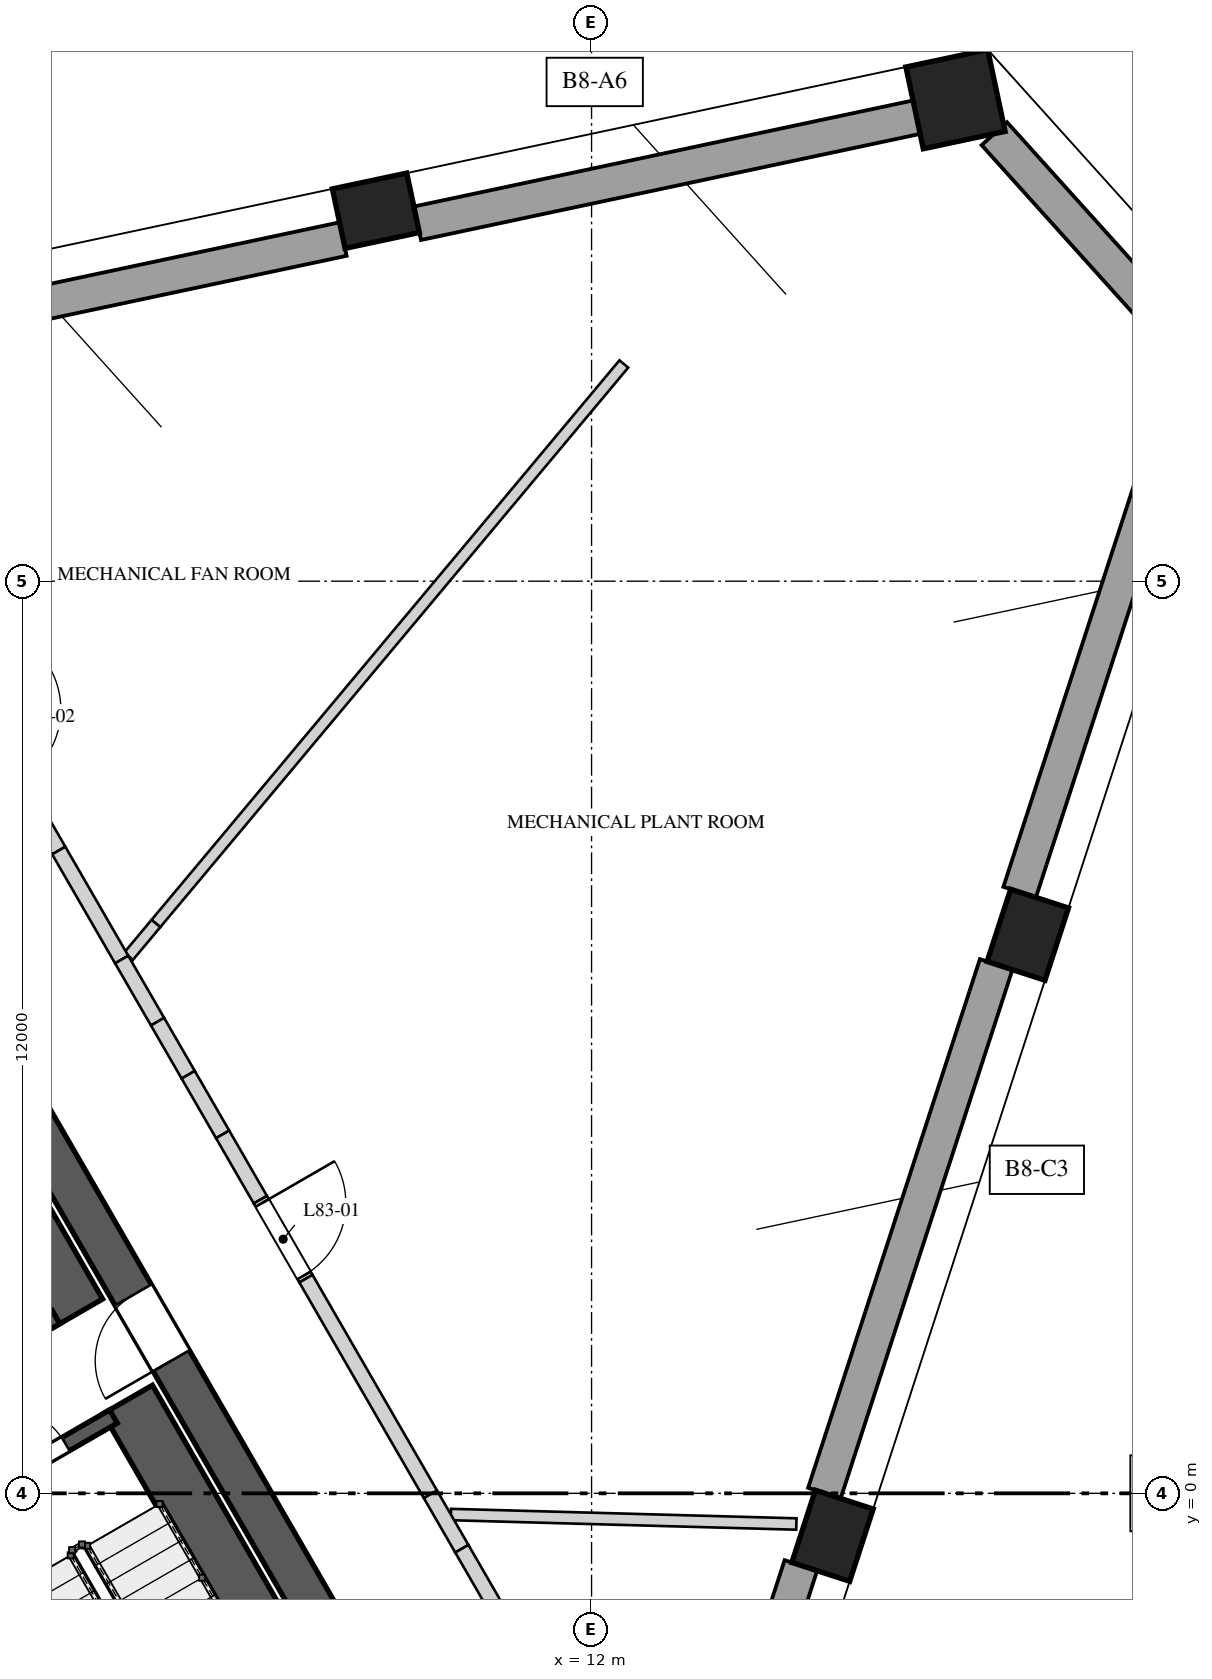
"""IFC4 building model, lengths in metres.
Left out: names, types, materials, properties, quantities, classifications, styles, units other than length and angle.
Written with IfcOpenShell. Run it as: python <this file> out.ifc"""

import sys

from ifc_helpers import new_model, si_unit, direction, frame, frame_2d, origin, origin_2d, place, context, subcontext, project, spatial, polyline, rectangle, outline, extrude, element, fill, save


model = new_model("IFC4")
c1 = context("Model", 3, precision=1e-05, world=origin(), true_north=direction((0.0, 1.0)))
c2 = subcontext(c1, "Body", "Model", "MODEL_VIEW")
j1 = project(units=[si_unit("LENGTHUNIT", "METRE"), si_unit("PLANEANGLEUNIT", "RADIAN")], contexts=[c1])
p1 = place(None, origin())
s1 = spatial("IfcSite", under=j1, at=p1, CompositionType="ELEMENT")
p2 = place(p1, origin())
s2 = spatial("IfcBuilding", under=s1, at=p2, CompositionType="ELEMENT")
p3 = place(p2, frame((0.0, 0.0, 361.4)))
s3 = spatial("IfcBuildingStorey", under=s2, at=p3, CompositionType="ELEMENT", Elevation=361.4)
p4 = place(p3, frame((9.93, -4.25, 0.0), z_axis=(0.0, 0.0, 1.0), x_axis=(-0.499994590896, 0.86602852671, 0.0)))
e1 = element("IfcWall", 1, at=p4, inside=s3, PredefinedType="SHEAR", context=c2, shape_type="SweptSolid", body=[
    extrude(rectangle(XDim=17.292, YDim=0.55, at=frame_2d((8.646, 0.0))), origin(), (0.0, 0.0, 1.0), 4.5),
])
p5 = place(p4, frame((6.921, 0.0, 0.0)))
e2 = element("IfcOpeningElement", 2, at=p5, cuts=e1, PredefinedType="OPENING", context=c2, shape_type="SweptSolid", body=[
    extrude(rectangle(XDim=1.0, YDim=2.4, at=frame_2d((0.5, 1.2))), frame((0.0, 0.285, 0.0), z_axis=(0.0, -1.0, 0.0), x_axis=(1.0, 0.0, 0.0)), (0.0, 0.0, 1.0), 0.57),
])
for number, where, z_axis, x_axis in (
    (3, (15.17, -0.558, 0.0), (0.0, 0.0, 1.0), (0.309, 0.951, 0.0)),
    (4, (17.739, 7.349, 0.0), (0.0, 0.0, 1.0), (0.309, 0.951, 0.0)),
):
    element("IfcColumn", number, at=place(p3, frame(where, z_axis=z_axis, x_axis=x_axis)), inside=s3, PredefinedType="COLUMN", context=c2, shape_type="SweptSolid", body=[
        extrude(rectangle(XDim=1.0, YDim=0.8, at=origin_2d()), origin(), (0.0, 0.0, 1.0), 4.5),
    ])
p6 = place(p3, frame((16.788, 18.341, 0.0), z_axis=(0.0, 0.0, 1.0), x_axis=(-0.978147600734, -0.207911690818, 0.0)))
e5 = element("IfcColumn", 5, at=p6, inside=s3, PredefinedType="COLUMN", context=c2, shape_type="SweptSolid", body=[
    extrude(rectangle(XDim=1.1, YDim=1.1, at=origin_2d()), origin(), (0.0, 0.0, 1.0), 4.5),
])
p7 = place(p3, frame((9.163, 16.874, 0.0), z_axis=(0.0, 0.0, 1.0), x_axis=(-0.978147600734, -0.207911690818, 0.0)))
e6 = element("IfcColumn", 6, at=p7, inside=s3, PredefinedType="COLUMN", context=c2, shape_type="SweptSolid", body=[
    extrude(rectangle(XDim=1.0, YDim=0.8, at=origin_2d()), origin(), (0.0, 0.0, 1.0), 4.5),
])
for number, where, z_axis, x_axis in (
    (7, (12.494, -7.905, 0.0), (0.0, 0.0, 1.0), (0.309, 0.951, 0.0)),
    (8, (15.063, 0.002, 0.0), (0.0, 0.0, 1.0), (0.309, 0.951, 0.0)),
):
    element("IfcWall", number, at=place(p3, frame(where, z_axis=z_axis, x_axis=x_axis)), inside=s3, PredefinedType="SOLIDWALL", context=c2, shape_type="SweptSolid", body=[
        extrude(rectangle(XDim=7.314, YDim=0.45, at=frame_2d((3.657, 0.0))), origin(), (0.0, 0.0, 1.0), 3.8),
    ])
p8 = place(p3, frame((17.632, 7.909, 0.0), z_axis=(0.0, 0.0, 1.0), x_axis=(0.309018647645, 0.951055979114, 0.0)))
e9 = element("IfcWall", 9, at=p8, inside=s3, PredefinedType="SOLIDWALL", context=c2, shape_type="SweptSolid", body=[
    extrude(rectangle(XDim=6.714, YDim=0.45, at=frame_2d((3.357, 0.0))), origin(), (0.0, 0.0, 1.0), 3.8),
])
p9 = place(p3, frame((19.598, 15.335, 0.0), z_axis=(0.0, 0.0, 1.0), x_axis=(-0.669109997009, 0.743163381702, 0.0)))
e10 = element("IfcWall", 10, at=p9, inside=s3, PredefinedType="SOLIDWALL", context=c2, shape_type="SweptSolid", body=[
    extrude(rectangle(XDim=3.435, YDim=0.45, at=frame_2d((1.718, 0.0))), origin(), (0.0, 0.0, 1.0), 3.8),
])
p10 = place(p3, frame((8.731, 16.501, 0.0), z_axis=(0.0, 0.0, 1.0), x_axis=(-0.978151299843, -0.207894287118, 0.0)))
e11 = element("IfcWall", 11, at=p10, inside=s3, PredefinedType="SOLIDWALL", context=c2, shape_type="SweptSolid", body=[
    extrude(rectangle(XDim=7.314, YDim=0.45, at=frame_2d((3.657, 0.0))), origin(), (0.0, 0.0, 1.0), 3.8),
])
p11 = place(p3, frame((16.276, 18.105, 0.0), z_axis=(0.0, 0.0, 1.0), x_axis=(-0.978144338977, -0.207927035587, 0.0)))
e12 = element("IfcWall", 12, at=p11, inside=s3, PredefinedType="SOLIDWALL", context=c2, shape_type="SweptSolid", body=[
    extrude(rectangle(XDim=6.714, YDim=0.45, at=frame_2d((3.357, 0.0))), origin(), (0.0, 0.0, 1.0), 3.8),
])
p12 = place(p3, frame((8.998, -4.135, 0.0), z_axis=(0.0, 0.0, 1.0), x_axis=(-0.500009909098, 0.866019682689, 0.0)))
e13 = element("IfcWall", 13, at=p12, inside=s3, PredefinedType="SOLIDWALL", context=c2, shape_type="SweptSolid", body=[
    extrude(rectangle(XDim=6.2, YDim=0.75, at=frame_2d((3.1, 0.0))), origin(), (0.0, 0.0, 1.0), 4.15),
])
p13 = place(p3, frame((6.465, -5.597, 0.0), z_axis=(0.0, 0.0, 1.0), x_axis=(-0.49998037582, 0.866036733513, 0.0)))
e14 = element("IfcWall", 14, at=p13, inside=s3, PredefinedType="SOLIDWALL", context=c2, shape_type="SweptSolid", body=[
    extrude(rectangle(XDim=6.2, YDim=0.2, at=frame_2d((3.1, 0.0))), origin(), (0.0, 0.0, 1.0), 4.15),
])
p14 = place(p3, frame((3.501, -0.265, 0.0), z_axis=(0.0, 0.0, 1.0), x_axis=(0.866030925526, 0.499990435942, 0.0)))
e15 = element("IfcWall", 15, at=p14, inside=s3, PredefinedType="SOLIDWALL", context=c2, shape_type="SweptSolid", body=[
    extrude(rectangle(XDim=2.55, YDim=0.2, at=frame_2d((1.275, 0.0))), origin(), (0.0, 0.0, 1.0), 4.15),
])
p15 = place(p14, frame((0.725, 0.0, 0.0)))
e16 = element("IfcOpeningElement", 16, at=p15, cuts=e15, PredefinedType="OPENING", context=c2, shape_type="SweptSolid", body=[
    extrude(rectangle(XDim=1.1, YDim=2.4, at=frame_2d((0.55, 1.2))), frame((0.0, 0.11, 0.0), z_axis=(0.0, -1.0, 0.0), x_axis=(1.0, 0.0, 0.0)), (0.0, 0.0, 1.0), 0.22),
])
p16 = place(p3, frame((5.243, 2.369, 0.0), z_axis=(0.0, 0.0, 1.0), x_axis=(-0.500002801628, 0.866023786258, 0.0)))
e17 = element("IfcWall", 17, at=p16, inside=s3, PredefinedType="SOLIDWALL", context=c2, shape_type="SweptSolid", body=[
    extrude(rectangle(XDim=4.9, YDim=0.75, at=frame_2d((2.45, 0.0))), origin(), (0.0, 0.0, 1.0), 4.15),
])
p17 = place(p3, frame((2.227, 0.743, 0.0), z_axis=(0.0, 0.0, 1.0), x_axis=(0.866035871367, 0.499981869177, 0.0)))
e18 = element("IfcWall", 18, at=p17, inside=s3, PredefinedType="SOLIDWALL", context=c2, shape_type="SweptSolid", body=[
    extrude(rectangle(XDim=3.15, YDim=0.2, at=frame_2d((1.575, 0.0))), origin(), (0.0, 0.0, 1.0), 4.15),
])
p18 = place(p3, frame((5.909, 7.066, 0.0), z_axis=(0.0, 0.0, 1.0), x_axis=(0.641462458468, 0.767154426681, 0.0)))
e19 = element("IfcWall", 19, at=p18, inside=s3, PredefinedType="PARTITIONING", context=c2, shape_type="SweptSolid", body=[
    extrude(rectangle(XDim=0.563, YDim=0.15, at=frame_2d((0.282, 0.0))), origin(), (0.0, 0.0, 1.0), 3.05),
])
p19 = place(p3, frame((6.27, 7.498, 0.0), z_axis=(0.0, 0.0, 1.0), x_axis=(0.641480057803, 0.76713971051, 0.0)))
e20 = element("IfcWall", 20, at=p19, inside=s3, PredefinedType="PARTITIONING", context=c2, shape_type="SweptSolid", body=[
    extrude(rectangle(XDim=9.594, YDim=0.15, at=frame_2d((4.797, 0.0))), origin(), (0.0, 0.0, 1.0), 4.15),
])
p20 = place(p3, frame((14.694, -0.404, 0.0), z_axis=(0.0, 0.0, 1.0), x_axis=(-0.999623515505, 0.027437697611, 0.0)))
e21 = element("IfcWall", 21, at=p20, inside=s3, PredefinedType="PARTITIONING", context=c2, shape_type="SweptSolid", body=[
    extrude(rectangle(XDim=4.547, YDim=0.15, at=frame_2d((2.273, 0.0))), origin(), (0.0, 0.0, 1.0), 3.45),
])
p21 = place(p3, frame((4.58, 9.167, 0.0), z_axis=(0.0, 0.0, 1.0), x_axis=(0.499945576647, -0.866056822842, 0.0)))
e22 = element("IfcWall", 22, at=p21, inside=s3, PredefinedType="SOLIDWALL", context=c2, shape_type="SweptSolid", body=[
    extrude(rectangle(XDim=0.821, YDim=0.2, at=frame_2d((0.41, 0.0))), origin(), (0.0, 0.0, 1.0), 3.45),
])
p22 = place(p3, frame((4.99, 8.457, 0.0), z_axis=(0.0, 0.0, 1.0), x_axis=(0.500024536802, -0.866011236992, 0.0)))
e23 = element("IfcWall", 23, at=p22, inside=s3, PredefinedType="SOLIDWALL", context=c2, shape_type="SweptSolid", body=[
    extrude(rectangle(XDim=1.656, YDim=0.2, at=frame_2d((0.828, 0.0))), origin(), (0.0, 0.0, 1.0), 4.15),
])
p23 = place(p3, frame((5.818, 7.023, 0.0), z_axis=(0.0, 0.0, 1.0), x_axis=(0.500006071987, -0.866021898093, 0.0)))
e24 = element("IfcWall", 24, at=p23, inside=s3, PredefinedType="SOLIDWALL", context=c2, shape_type="SweptSolid", body=[
    extrude(rectangle(XDim=0.944, YDim=0.2, at=frame_2d((0.472, 0.0))), origin(), (0.0, 0.0, 1.0), 3.05),
])
p24 = place(p3, frame((6.29, 6.205, 0.0), z_axis=(0.0, 0.0, 1.0), x_axis=(0.500045602705, -0.86599907345, 0.0)))
e25 = element("IfcWall", 25, at=p24, inside=s3, PredefinedType="SOLIDWALL", context=c2, shape_type="SweptSolid", body=[
    extrude(rectangle(XDim=0.807, YDim=0.2, at=frame_2d((0.403, 0.0))), origin(), (0.0, 0.0, 1.0), 4.15),
])
p25 = place(p3, frame((6.693, 5.507, 0.0), z_axis=(0.0, 0.0, 1.0), x_axis=(0.499994660107, -0.866028486751, 0.0)))
e26 = element("IfcWall", 26, at=p25, inside=s3, PredefinedType="SOLIDWALL", context=c2, shape_type="SweptSolid", body=[
    extrude(rectangle(XDim=0.906, YDim=0.2, at=frame_2d((0.453, 0.0))), origin(), (0.0, 0.0, 1.0), 3.05),
])
p26 = place(p3, frame((7.146, 4.722, 0.0), z_axis=(0.0, 0.0, 1.0), x_axis=(0.500056181943, -0.865992964694, 0.0)))
e27 = element("IfcWall", 27, at=p26, inside=s3, PredefinedType="SOLIDWALL", context=c2, shape_type="SweptSolid", body=[
    extrude(rectangle(XDim=0.992, YDim=0.2, at=frame_2d((0.496, 0.0))), origin(), (0.0, 0.0, 1.0), 4.15),
])
p27 = place(p3, frame((7.642, 3.863, 0.0), z_axis=(0.0, 0.0, 1.0), x_axis=(0.499880961361, -0.866094119867, 0.0)))
e28 = element("IfcWall", 28, at=p27, inside=s3, PredefinedType="SOLIDWALL", context=c2, shape_type="SweptSolid", body=[
    extrude(outline(polyline([(0.0, 0.0), (1.2, 0.0), (1.2, 4.15), (1.053, 4.15), (1.053, 3.25), (0.246, 3.25), (0.246, 4.15), (0.0, 4.15), (0.0, 0.0)])), frame((0.0, 0.1, 0.0), z_axis=(0.0, -1.0, 0.0), x_axis=(1.0, 0.0, 0.0)), (0.0, 0.0, 1.0), 0.2),
])
p28 = place(p27, frame((0.05, 0.0, 0.0)))
e29 = element("IfcOpeningElement", 29, at=p28, cuts=e28, PredefinedType="OPENING", context=c2, shape_type="SweptSolid", body=[
    extrude(rectangle(XDim=1.1, YDim=2.4, at=frame_2d((0.55, 1.2))), frame((0.0, 0.11, 0.0), z_axis=(0.0, -1.0, 0.0), x_axis=(1.0, 0.0, 0.0)), (0.0, 0.0, 1.0), 0.22),
])
p29 = place(p3, frame((8.242, 2.824, 0.0), z_axis=(0.0, 0.0, 1.0), x_axis=(0.500001965626, -0.866024268927, 0.0)))
e30 = element("IfcWall", 30, at=p29, inside=s3, PredefinedType="SOLIDWALL", context=c2, shape_type="SweptSolid", body=[
    extrude(rectangle(XDim=3.276, YDim=0.2, at=frame_2d((1.638, 0.0))), origin(), (0.0, 0.0, 1.0), 4.15),
])
p30 = place(p3, frame((9.88, -0.013, 0.0), z_axis=(0.0, 0.0, 1.0), x_axis=(0.499952654668, -0.866052736899, 0.0)))
e31 = element("IfcWall", 31, at=p30, inside=s3, PredefinedType="SOLIDWALL", context=c2, shape_type="SweptSolid", body=[
    extrude(rectangle(XDim=0.826, YDim=0.2, at=frame_2d((0.413, 0.0))), origin(), (0.0, 0.0, 1.0), 3.45),
])
p31 = place(p3, frame((10.293, -0.729, 0.0), z_axis=(0.0, 0.0, 1.0), x_axis=(0.50002046505, -0.86601358796, 0.0)))
e32 = element("IfcWall", 32, at=p31, inside=s3, PredefinedType="SOLIDWALL", context=c2, shape_type="SweptSolid", body=[
    extrude(rectangle(XDim=4.066, YDim=0.2, at=frame_2d((2.033, 0.0))), origin(), (0.0, 0.0, 1.0), 4.15),
])
p32 = place(p15, origin())
e33 = element("IfcDoor", 33, at=p32, inside=s3, OperationType="SINGLE_SWING_RIGHT", PredefinedType="DOOR", context=c2, shape_type="SweptSolid", body=[
    extrude(rectangle(XDim=1.1, YDim=2.4, at=frame_2d((0.55, 1.2))), frame((0.0, 0.025, 0.0), z_axis=(0.0, -1.0, 0.0), x_axis=(1.0, 0.0, 0.0)), (0.0, 0.0, 1.0), 0.05),
])
fill(e16, e33)
p33 = place(p5, origin())
e34 = element("IfcDoor", 34, at=p33, inside=s3, OperationType="SINGLE_SWING_RIGHT", PredefinedType="DOOR", context=c2, shape_type="SweptSolid", body=[
    extrude(rectangle(XDim=1.0, YDim=2.4, at=frame_2d((0.5, 1.2))), frame((0.0, 0.025, 0.0), z_axis=(0.0, -1.0, 0.0), x_axis=(1.0, 0.0, 0.0)), (0.0, 0.0, 1.0), 0.05),
])
fill(e2, e34)
p34 = place(p28, origin())
e35 = element("IfcDoor", 35, at=p34, inside=s3, OperationType="SINGLE_SWING_RIGHT", PredefinedType="DOOR", context=c2, shape_type="SweptSolid", body=[
    extrude(rectangle(XDim=1.1, YDim=2.4, at=frame_2d((0.55, 1.2))), frame((0.0, 0.025, 0.0), z_axis=(0.0, -1.0, 0.0), x_axis=(1.0, 0.0, 0.0)), (0.0, 0.0, 1.0), 0.05),
])
fill(e29, e35)
save(model, sys.argv[1])
